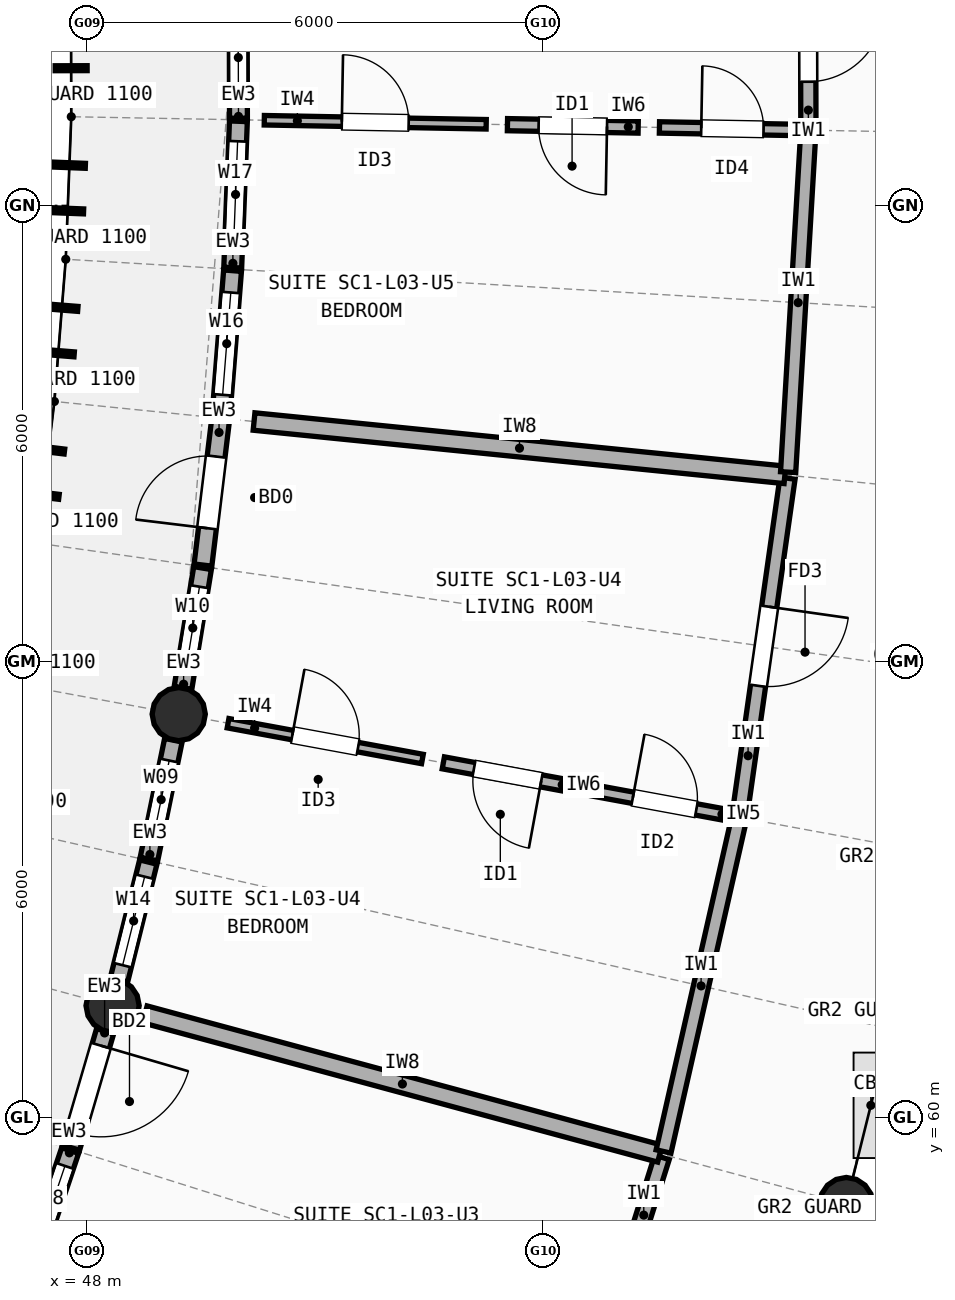
"""IFC4 building model, lengths in metres.
Left out: names, types, materials, properties, quantities, classifications, styles, units other than length and angle.
Written with IfcOpenShell. Run it as: python <this file> out.ifc"""

import sys

from ifc_helpers import new_model, si_unit, direction, frame, frame_2d, origin, origin_2d, place, context, subcontext, project, spatial, rectangle, circle, extrude, element, fill, save


model = new_model("IFC4")
c1 = context("Model", 3, precision=1e-05, world=origin(), true_north=direction((0.0, 1.0)))
c2 = subcontext(c1, "Body", "Model", "MODEL_VIEW")
j1 = project(units=[si_unit("LENGTHUNIT", "METRE"), si_unit("PLANEANGLEUNIT", "RADIAN")], contexts=[c1])
p1 = place(None, origin())
s1 = spatial("IfcSite", under=j1, at=p1, CompositionType="ELEMENT")
p2 = place(p1, origin())
s2 = spatial("IfcBuilding", under=s1, at=p2, CompositionType="ELEMENT")
p3 = place(p2, frame((0.0, 0.0, 10.9)))
s3 = spatial("IfcBuildingStorey", under=s2, at=p3, CompositionType="ELEMENT", Elevation=10.9)
for number, where, z_axis, x_axis in (
    (1, (48.336, 61.471, 0.0), (0.0, 0.0, 1.0), (1.0, 0.0, 0.0)),
    (2, (57.99, 58.861, 0.0), (0.0, 0.0, 1.0), (1.0, 0.0, 0.0)),
    (3, (49.206, 65.306, 0.0), (0.0, 0.0, 1.0), (1.0, 0.0, 0.0)),
):
    element("IfcColumn", number, at=place(p3, frame(where, z_axis=z_axis, x_axis=x_axis)), inside=s3, PredefinedType="COLUMN", context=c2, shape_type="SweptSolid", body=[
        extrude(circle(Radius=0.35, at=origin_2d()), origin(), (0.0, 0.0, 1.0), 2.948),
    ])
p4 = place(p3, frame((47.161, 57.739, 0.0), z_axis=(0.0, 0.0, 1.0), x_axis=(0.319798549746, 0.947485560618, 0.0)))
e4 = element("IfcWall", 4, at=p4, inside=s3, PredefinedType="STANDARD", context=c2, shape_type="SweptSolid", body=[
    extrude(rectangle(XDim=1.927, YDim=0.235, at=frame_2d((0.963, 0.0))), origin(), (0.0, 0.0, 1.0), 2.684),
])
p5 = place(p4, frame((0.213, 0.0, 0.85)))
e5 = element("IfcOpeningElement", 5, at=p5, cuts=e4, PredefinedType="OPENING", context=c2, shape_type="SweptSolid", body=[
    extrude(rectangle(XDim=1.5, YDim=1.4, at=frame_2d((0.75, 0.7))), frame((0.0, 0.127, 0.0), z_axis=(0.0, -1.0, 0.0), x_axis=(1.0, 0.0, 0.0)), (0.0, 0.0, 1.0), 0.255),
])
p6 = place(p3, frame((47.79, 59.603, 0.0), z_axis=(0.0, 0.0, 1.0), x_axis=(0.28073386291, 0.959785652224, 0.0)))
e6 = element("IfcWall", 6, at=p6, inside=s3, PredefinedType="STANDARD", context=c2, shape_type="SweptSolid", body=[
    extrude(rectangle(XDim=1.597, YDim=0.235, at=frame_2d((0.798, 0.0))), origin(), (0.0, 0.0, 1.0), 2.684),
])
p7 = place(p6, frame((0.198, 0.0, 0.0)))
e7 = element("IfcOpeningElement", 7, at=p7, cuts=e6, PredefinedType="OPENING", context=c2, shape_type="SweptSolid", body=[
    extrude(rectangle(XDim=1.2, YDim=2.15, at=frame_2d((0.6, 1.075))), frame((0.0, 0.127, 0.0), z_axis=(0.0, -1.0, 0.0), x_axis=(1.0, 0.0, 0.0)), (0.0, 0.0, 1.0), 0.255),
])
p8 = place(p3, frame((48.42, 61.811, 0.0), z_axis=(0.0, 0.0, 1.0), x_axis=(0.241240447943, 0.970465376135, 0.0)))
e8 = element("IfcWall", 8, at=p8, inside=s3, PredefinedType="STANDARD", context=c2, shape_type="SweptSolid", body=[
    extrude(rectangle(XDim=1.597, YDim=0.235, at=frame_2d((0.798, 0.0))), origin(), (0.0, 0.0, 1.0), 2.684),
])
p9 = place(p8, frame((0.198, 0.0, 0.85)))
e9 = element("IfcOpeningElement", 9, at=p9, cuts=e8, PredefinedType="OPENING", context=c2, shape_type="SweptSolid", body=[
    extrude(rectangle(XDim=1.2, YDim=1.5, at=frame_2d((0.6, 0.75))), frame((0.0, 0.127, 0.0), z_axis=(0.0, -1.0, 0.0), x_axis=(1.0, 0.0, 0.0)), (0.0, 0.0, 1.0), 0.255),
])
p10 = place(p3, frame((48.814, 63.399, 0.0), z_axis=(0.0, 0.0, 1.0), x_axis=(0.201199946108, 0.979550193551, 0.0)))
e10 = element("IfcWall", 10, at=p10, inside=s3, PredefinedType="STANDARD", context=c2, shape_type="SweptSolid", body=[
    extrude(rectangle(XDim=1.597, YDim=0.235, at=frame_2d((0.798, 0.0))), origin(), (0.0, 0.0, 1.0), 2.684),
])
p11 = place(p10, frame((0.273, 0.0, 0.85)))
e11 = element("IfcOpeningElement", 11, at=p11, cuts=e10, PredefinedType="OPENING", context=c2, shape_type="SweptSolid", body=[
    extrude(rectangle(XDim=1.05, YDim=1.35, at=frame_2d((0.525, 0.675))), frame((0.0, 0.127, 0.0), z_axis=(0.0, -1.0, 0.0), x_axis=(1.0, 0.0, 0.0)), (0.0, 0.0, 1.0), 0.255),
])
p12 = place(p3, frame((49.262, 65.652, 0.0), z_axis=(0.0, 0.0, 1.0), x_axis=(0.16100120568, 0.986954209561, 0.0)))
e12 = element("IfcWall", 12, at=p12, inside=s3, PredefinedType="STANDARD", context=c2, shape_type="SweptSolid", body=[
    extrude(rectangle(XDim=1.597, YDim=0.235, at=frame_2d((0.798, 0.0))), origin(), (0.0, 0.0, 1.0), 2.684),
])
p13 = place(p12, frame((0.249, 0.0, 0.85)))
e13 = element("IfcOpeningElement", 13, at=p13, cuts=e12, PredefinedType="OPENING", context=c2, shape_type="SweptSolid", body=[
    extrude(rectangle(XDim=1.1, YDim=1.45, at=frame_2d((0.55, 0.725))), frame((0.0, 0.127, 0.0), z_axis=(0.0, -1.0, 0.0), x_axis=(1.0, 0.0, 0.0)), (0.0, 0.0, 1.0), 0.255),
])
p14 = place(p3, frame((49.525, 67.268, 0.0), z_axis=(0.0, 0.0, 1.0), x_axis=(0.120384349076, 0.992727358592, 0.0)))
e14 = element("IfcWall", 14, at=p14, inside=s3, PredefinedType="STANDARD", context=c2, shape_type="SweptSolid", body=[
    extrude(rectangle(XDim=1.927, YDim=0.235, at=frame_2d((0.963, 0.0))), origin(), (0.0, 0.0, 1.0), 2.684),
])
p15 = place(p14, frame((0.488, 0.0, 0.0)))
e15 = element("IfcOpeningElement", 15, at=p15, cuts=e14, PredefinedType="OPENING", context=c2, shape_type="SweptSolid", body=[
    extrude(rectangle(XDim=0.95, YDim=2.12, at=frame_2d((0.475, 1.06))), frame((0.0, 0.127, 0.0), z_axis=(0.0, -1.0, 0.0), x_axis=(1.0, 0.0, 0.0)), (0.0, 0.0, 1.0), 0.255),
])
p16 = place(p3, frame((49.761, 69.22, 0.0), z_axis=(0.0, 0.0, 1.0), x_axis=(0.079573991137, 0.996828962227, 0.0)))
e16 = element("IfcWall", 16, at=p16, inside=s3, PredefinedType="STANDARD", context=c2, shape_type="SweptSolid", body=[
    extrude(rectangle(XDim=1.927, YDim=0.235, at=frame_2d((0.963, 0.0))), origin(), (0.0, 0.0, 1.0), 2.948),
])
p17 = place(p16, frame((0.289, 0.0, 0.85)))
e17 = element("IfcOpeningElement", 17, at=p17, cuts=e16, PredefinedType="OPENING", context=c2, shape_type="SweptSolid", body=[
    extrude(rectangle(XDim=1.35, YDim=1.5, at=frame_2d((0.675, 0.75))), frame((0.0, 0.127, 0.0), z_axis=(0.0, -1.0, 0.0), x_axis=(1.0, 0.0, 0.0)), (0.0, 0.0, 1.0), 0.255),
])
p18 = place(p3, frame((49.917, 71.181, 0.0), z_axis=(0.0, 0.0, 1.0), x_axis=(0.038647240614, 0.999252916329, 0.0)))
e18 = element("IfcWall", 18, at=p18, inside=s3, PredefinedType="STANDARD", context=c2, shape_type="SweptSolid", body=[
    extrude(rectangle(XDim=1.927, YDim=0.235, at=frame_2d((0.963, 0.0))), origin(), (0.0, 0.0, 1.0), 2.684),
])
p19 = place(p18, frame((0.263, 0.0, 0.85)))
e19 = element("IfcOpeningElement", 19, at=p19, cuts=e18, PredefinedType="OPENING", context=c2, shape_type="SweptSolid", body=[
    extrude(rectangle(XDim=1.4, YDim=1.5, at=frame_2d((0.7, 0.75))), frame((0.0, 0.127, 0.0), z_axis=(0.0, -1.0, 0.0), x_axis=(1.0, 0.0, 0.0)), (0.0, 0.0, 1.0), 0.255),
])
p20 = place(p3, frame((49.992, 73.146, 0.0), z_axis=(0.0, 0.0, 1.0), x_axis=(-0.002293571949, 0.99999736976, 0.0)))
e20 = element("IfcWall", 20, at=p20, inside=s3, PredefinedType="STANDARD", context=c2, shape_type="SweptSolid", body=[
    extrude(rectangle(XDim=1.597, YDim=0.235, at=frame_2d((0.798, 0.0))), origin(), (0.0, 0.0, 1.0), 2.684),
])
p21 = place(p20, frame((0.198, 0.0, 0.85)))
e21 = element("IfcOpeningElement", 21, at=p21, cuts=e20, PredefinedType="OPENING", context=c2, shape_type="SweptSolid", body=[
    extrude(rectangle(XDim=1.2, YDim=1.45, at=frame_2d((0.6, 0.725))), frame((0.0, 0.127, 0.0), z_axis=(0.0, -1.0, 0.0), x_axis=(1.0, 0.0, 0.0)), (0.0, 0.0, 1.0), 0.255),
])
p22 = place(p3, frame((54.222, 55.215, 0.0), z_axis=(0.0, 0.0, 1.0), x_axis=(0.300377958446, 0.953820256694, 0.0)))
e22 = element("IfcWall", 22, at=p22, inside=s3, PredefinedType="SOLIDWALL", context=c2, shape_type="SweptSolid", body=[
    extrude(rectangle(XDim=4.467, YDim=0.2, at=frame_2d((2.233, 0.0))), origin(), (0.0, 0.0, 1.0), 2.742),
])
p23 = place(p22, frame((1.743, 0.0, 0.0)))
e23 = element("IfcOpeningElement", 23, at=p23, cuts=e22, PredefinedType="OPENING", context=c2, shape_type="SweptSolid", body=[
    extrude(rectangle(XDim=0.98, YDim=2.15, at=frame_2d((0.49, 1.075))), frame((0.0, 0.11, 0.0), z_axis=(0.0, -1.0, 0.0), x_axis=(1.0, 0.0, 0.0)), (0.0, 0.0, 1.0), 0.22),
])
p24 = place(p3, frame((48.761, 61.356, 0.0), z_axis=(0.0, 0.0, 1.0), x_axis=(0.965329768393, -0.26103340448, 0.0)))
e24 = element("IfcWall", 24, at=p24, inside=s3, PredefinedType="SOLIDWALL", context=c2, shape_type="SweptSolid", body=[
    extrude(rectangle(XDim=7.02, YDim=0.23, at=frame_2d((3.51, 0.0))), origin(), (0.0, 0.0, 1.0), 2.762),
])
p25 = place(p3, frame((55.585, 59.552, 0.0), z_axis=(0.0, 0.0, 1.0), x_axis=(0.221221895428, 0.97522349899, 0.0)))
e25 = element("IfcWall", 25, at=p25, inside=s3, PredefinedType="SOLIDWALL", context=c2, shape_type="SweptSolid", body=[
    extrude(rectangle(XDim=4.467, YDim=0.2, at=frame_2d((2.234, 0.0))), origin(), (0.0, 0.0, 1.0), 2.722),
])
p26 = place(p3, frame((56.588, 63.988, 0.0), z_axis=(0.0, 0.0, 1.0), x_axis=(0.140732688284, 0.990047630394, 0.0)))
e26 = element("IfcWall", 26, at=p26, inside=s3, PredefinedType="SOLIDWALL", context=c2, shape_type="SweptSolid", body=[
    extrude(rectangle(XDim=4.467, YDim=0.2, at=frame_2d((2.233, 0.0))), origin(), (0.0, 0.0, 1.0), 2.762),
])
p27 = place(p26, frame((1.708, 0.0, 0.0)))
e27 = element("IfcOpeningElement", 27, at=p27, cuts=e26, PredefinedType="OPENING", context=c2, shape_type="SweptSolid", body=[
    extrude(rectangle(XDim=1.05, YDim=2.15, at=frame_2d((0.525, 1.075))), frame((0.0, 0.11, 0.0), z_axis=(0.0, -1.0, 0.0), x_axis=(1.0, 0.0, 0.0)), (0.0, 0.0, 1.0), 0.22),
])
p28 = place(p3, frame((49.855, 65.187, 0.0), z_axis=(0.0, 0.0, 1.0), x_axis=(0.983443502225, -0.181215004706, 0.0)))
e28 = element("IfcWall", 28, at=p28, inside=s3, PredefinedType="PARTITIONING", context=c2, shape_type="SweptSolid", body=[
    extrude(rectangle(XDim=2.6, YDim=0.125, at=frame_2d((1.3, 0.0))), origin(), (0.0, 0.0, 1.0), 2.742),
])
p29 = place(p28, frame((0.86, 0.0, 0.0)))
e29 = element("IfcOpeningElement", 29, at=p29, cuts=e28, PredefinedType="OPENING", context=c2, shape_type="SweptSolid", body=[
    extrude(rectangle(XDim=0.88, YDim=2.1, at=frame_2d((0.44, 1.05))), frame((0.0, 0.073, 0.0), z_axis=(0.0, -1.0, 0.0), x_axis=(1.0, 0.0, 0.0)), (0.0, 0.0, 1.0), 0.145),
])
p30 = place(p3, frame((52.688, 64.665, 0.0), z_axis=(0.0, 0.0, 1.0), x_axis=(0.983463169084, -0.181108241269, 0.0)))
e30 = element("IfcWall", 30, at=p30, inside=s3, PredefinedType="PLUMBINGWALL", context=c2, shape_type="SweptSolid", body=[
    extrude(rectangle(XDim=1.72, YDim=0.16, at=frame_2d((0.86, 0.0))), origin(), (0.0, 0.0, 1.0), 2.742),
])
p31 = place(p30, frame((0.41, 0.0, 0.0)))
e31 = element("IfcOpeningElement", 31, at=p31, cuts=e30, PredefinedType="OPENING", context=c2, shape_type="SweptSolid", body=[
    extrude(rectangle(XDim=0.9, YDim=2.1, at=frame_2d((0.45, 1.05))), frame((0.0, 0.09, 0.0), z_axis=(0.0, -1.0, 0.0), x_axis=(1.0, 0.0, 0.0)), (0.0, 0.0, 1.0), 0.18),
])
p32 = place(p3, frame((54.655, 64.303, 0.0), z_axis=(0.0, 0.0, 1.0), x_axis=(0.983468686283, -0.181078278933, 0.0)))
e32 = element("IfcWall", 32, at=p32, inside=s3, PredefinedType="PARTITIONING", context=c2, shape_type="SweptSolid", body=[
    extrude(rectangle(XDim=1.92, YDim=0.15, at=frame_2d((0.96, 0.0))), origin(), (0.0, 0.0, 1.0), 2.742),
])
p33 = place(p32, frame((0.535, 0.0, 0.0)))
e33 = element("IfcOpeningElement", 33, at=p33, cuts=e32, PredefinedType="OPENING", context=c2, shape_type="SweptSolid", body=[
    extrude(rectangle(XDim=0.85, YDim=2.1, at=frame_2d((0.425, 1.05))), frame((0.0, 0.085, 0.0), z_axis=(0.0, -1.0, 0.0), x_axis=(1.0, 0.0, 0.0)), (0.0, 0.0, 1.0), 0.17),
])
p34 = place(p3, frame((50.197, 69.156, 0.0), z_axis=(0.0, 0.0, 1.0), x_axis=(0.994988519083, -0.09998923389, 0.0)))
e34 = element("IfcWall", 34, at=p34, inside=s3, PredefinedType="SOLIDWALL", context=c2, shape_type="SweptSolid", body=[
    extrude(rectangle(XDim=7.02, YDim=0.23, at=frame_2d((3.51, 0.0))), origin(), (0.0, 0.0, 1.0), 2.722),
])
p35 = place(p3, frame((57.224, 68.49, 0.0), z_axis=(0.0, 0.0, 1.0), x_axis=(0.059132085895, 0.998250167252, 0.0)))
e35 = element("IfcWall", 35, at=p35, inside=s3, PredefinedType="SOLIDWALL", context=c2, shape_type="SweptSolid", body=[
    extrude(rectangle(XDim=4.467, YDim=0.2, at=frame_2d((2.234, 0.0))), origin(), (0.0, 0.0, 1.0), 2.742),
])
p36 = place(p3, frame((57.491, 73.029, 0.0), z_axis=(0.0, 0.0, 1.0), x_axis=(-0.0023367022, 0.999997269908, 0.0)))
e36 = element("IfcWall", 36, at=p36, inside=s3, PredefinedType="SOLIDWALL", context=c2, shape_type="SweptSolid", body=[
    extrude(rectangle(XDim=2.194, YDim=0.2, at=frame_2d((1.097, 0.0))), origin(), (0.0, 0.0, 1.0), 2.96),
])
p37 = place(p36, frame((0.597, 0.0, 0.0)))
e37 = element("IfcOpeningElement", 37, at=p37, cuts=e36, PredefinedType="OPENING", context=c2, shape_type="SweptSolid", body=[
    extrude(rectangle(XDim=1.0, YDim=2.15, at=frame_2d((0.5, 1.075))), frame((0.0, 0.11, 0.0), z_axis=(0.0, -1.0, 0.0), x_axis=(1.0, 0.0, 0.0)), (0.0, 0.0, 1.0), 0.22),
])
p38 = place(p3, frame((50.332, 73.12, 0.0), z_axis=(0.0, 0.0, 1.0), x_axis=(0.999833866331, -0.018227444628, 0.0)))
e38 = element("IfcWall", 38, at=p38, inside=s3, PredefinedType="PARTITIONING", context=c2, shape_type="SweptSolid", body=[
    extrude(rectangle(XDim=2.92, YDim=0.125, at=frame_2d((1.46, 0.0))), origin(), (0.0, 0.0, 1.0), 2.762),
])
p39 = place(p38, frame((1.02, 0.0, 0.0)))
e39 = element("IfcOpeningElement", 39, at=p39, cuts=e38, PredefinedType="OPENING", context=c2, shape_type="SweptSolid", body=[
    extrude(rectangle(XDim=0.88, YDim=2.1, at=frame_2d((0.44, 1.05))), frame((0.0, 0.073, 0.0), z_axis=(0.0, -1.0, 0.0), x_axis=(1.0, 0.0, 0.0)), (0.0, 0.0, 1.0), 0.145),
])
p40 = place(p3, frame((53.531, 73.062, 0.0), z_axis=(0.0, 0.0, 1.0), x_axis=(0.999832350792, -0.018310388026, 0.0)))
e40 = element("IfcWall", 40, at=p40, inside=s3, PredefinedType="PLUMBINGWALL", context=c2, shape_type="SweptSolid", body=[
    extrude(rectangle(XDim=1.72, YDim=0.16, at=frame_2d((0.86, 0.0))), origin(), (0.0, 0.0, 1.0), 2.762),
])
p41 = place(p40, frame((0.41, 0.0, 0.0)))
e41 = element("IfcOpeningElement", 41, at=p41, cuts=e40, PredefinedType="OPENING", context=c2, shape_type="SweptSolid", body=[
    extrude(rectangle(XDim=0.9, YDim=2.1, at=frame_2d((0.45, 1.05))), frame((0.0, 0.09, 0.0), z_axis=(0.0, -1.0, 0.0), x_axis=(1.0, 0.0, 0.0)), (0.0, 0.0, 1.0), 0.18),
])
p42 = place(p3, frame((55.531, 73.025, 0.0), z_axis=(0.0, 0.0, 1.0), x_axis=(0.99983466766, -0.018183436026, 0.0)))
e42 = element("IfcWall", 42, at=p42, inside=s3, PredefinedType="PARTITIONING", context=c2, shape_type="SweptSolid", body=[
    extrude(rectangle(XDim=1.92, YDim=0.15, at=frame_2d((0.96, 0.0))), origin(), (0.0, 0.0, 1.0), 2.762),
])
p43 = place(p42, frame((0.55, 0.0, 0.0)))
e43 = element("IfcOpeningElement", 43, at=p43, cuts=e42, PredefinedType="OPENING", context=c2, shape_type="SweptSolid", body=[
    extrude(rectangle(XDim=0.82, YDim=2.08, at=frame_2d((0.41, 1.04))), frame((0.0, 0.085, 0.0), z_axis=(0.0, -1.0, 0.0), x_axis=(1.0, 0.0, 0.0)), (0.0, 0.0, 1.0), 0.17),
])
p44 = place(p5, origin())
e44 = element("IfcWindow", 44, at=p44, inside=s3, PartitioningType="SINGLE_PANEL", PredefinedType="WINDOW", context=c2, shape_type="SweptSolid", body=[
    extrude(rectangle(XDim=1.5, YDim=1.4, at=frame_2d((0.75, 0.7))), frame((0.0, 0.03, 0.0), z_axis=(0.0, -1.0, 0.0), x_axis=(1.0, 0.0, 0.0)), (0.0, 0.0, 1.0), 0.06),
])
fill(e5, e44)
p45 = place(p7, origin())
e45 = element("IfcDoor", 45, at=p45, inside=s3, OperationType="SINGLE_SWING_RIGHT", PredefinedType="DOOR", context=c2, shape_type="SweptSolid", body=[
    extrude(rectangle(XDim=1.2, YDim=2.15, at=frame_2d((0.6, 1.075))), frame((0.0, 0.025, 0.0), z_axis=(0.0, -1.0, 0.0), x_axis=(1.0, 0.0, 0.0)), (0.0, 0.0, 1.0), 0.05),
])
fill(e7, e45)
p46 = place(p9, origin())
e46 = element("IfcWindow", 46, at=p46, inside=s3, PartitioningType="SINGLE_PANEL", PredefinedType="WINDOW", context=c2, shape_type="SweptSolid", body=[
    extrude(rectangle(XDim=1.2, YDim=1.5, at=frame_2d((0.6, 0.75))), frame((0.0, 0.03, 0.0), z_axis=(0.0, -1.0, 0.0), x_axis=(1.0, 0.0, 0.0)), (0.0, 0.0, 1.0), 0.06),
])
fill(e9, e46)
p47 = place(p11, origin())
e47 = element("IfcWindow", 47, at=p47, inside=s3, PartitioningType="SINGLE_PANEL", PredefinedType="WINDOW", context=c2, shape_type="SweptSolid", body=[
    extrude(rectangle(XDim=1.05, YDim=1.35, at=frame_2d((0.525, 0.675))), frame((0.0, 0.03, 0.0), z_axis=(0.0, -1.0, 0.0), x_axis=(1.0, 0.0, 0.0)), (0.0, 0.0, 1.0), 0.06),
])
fill(e11, e47)
p48 = place(p13, origin())
e48 = element("IfcWindow", 48, at=p48, inside=s3, PartitioningType="SINGLE_PANEL", PredefinedType="WINDOW", context=c2, shape_type="SweptSolid", body=[
    extrude(rectangle(XDim=1.1, YDim=1.45, at=frame_2d((0.55, 0.725))), frame((0.0, 0.03, 0.0), z_axis=(0.0, -1.0, 0.0), x_axis=(1.0, 0.0, 0.0)), (0.0, 0.0, 1.0), 0.06),
])
fill(e13, e48)
p49 = place(p15, origin())
e49 = element("IfcDoor", 49, at=p49, inside=s3, OperationType="SINGLE_SWING_LEFT", PredefinedType="DOOR", context=c2, shape_type="SweptSolid", body=[
    extrude(rectangle(XDim=0.95, YDim=2.12, at=frame_2d((0.475, 1.06))), frame((0.0, 0.025, 0.0), z_axis=(0.0, -1.0, 0.0), x_axis=(1.0, 0.0, 0.0)), (0.0, 0.0, 1.0), 0.05),
])
fill(e15, e49)
p50 = place(p17, origin())
e50 = element("IfcWindow", 50, at=p50, inside=s3, PartitioningType="SINGLE_PANEL", PredefinedType="WINDOW", context=c2, shape_type="SweptSolid", body=[
    extrude(rectangle(XDim=1.35, YDim=1.5, at=frame_2d((0.675, 0.75))), frame((0.0, 0.03, 0.0), z_axis=(0.0, -1.0, 0.0), x_axis=(1.0, 0.0, 0.0)), (0.0, 0.0, 1.0), 0.06),
])
fill(e17, e50)
p51 = place(p19, origin())
e51 = element("IfcWindow", 51, at=p51, inside=s3, PartitioningType="SINGLE_PANEL", PredefinedType="WINDOW", context=c2, shape_type="SweptSolid", body=[
    extrude(rectangle(XDim=1.4, YDim=1.5, at=frame_2d((0.7, 0.75))), frame((0.0, 0.03, 0.0), z_axis=(0.0, -1.0, 0.0), x_axis=(1.0, 0.0, 0.0)), (0.0, 0.0, 1.0), 0.06),
])
fill(e19, e51)
p52 = place(p21, origin())
e52 = element("IfcWindow", 52, at=p52, inside=s3, PartitioningType="SINGLE_PANEL", PredefinedType="WINDOW", context=c2, shape_type="SweptSolid", body=[
    extrude(rectangle(XDim=1.2, YDim=1.45, at=frame_2d((0.6, 0.725))), frame((0.0, 0.03, 0.0), z_axis=(0.0, -1.0, 0.0), x_axis=(1.0, 0.0, 0.0)), (0.0, 0.0, 1.0), 0.06),
])
fill(e21, e52)
p53 = place(p27, origin())
e53 = element("IfcDoor", 53, at=p53, inside=s3, OperationType="SINGLE_SWING_RIGHT", PredefinedType="DOOR", context=c2, shape_type="SweptSolid", body=[
    extrude(rectangle(XDim=1.05, YDim=2.15, at=frame_2d((0.525, 1.075))), frame((0.0, 0.025, 0.0), z_axis=(0.0, -1.0, 0.0), x_axis=(1.0, 0.0, 0.0)), (0.0, 0.0, 1.0), 0.05),
])
fill(e27, e53)
p54 = place(p29, origin())
e54 = element("IfcDoor", 54, at=p54, inside=s3, OperationType="SINGLE_SWING_LEFT", PredefinedType="DOOR", context=c2, shape_type="SweptSolid", body=[
    extrude(rectangle(XDim=0.88, YDim=2.1, at=frame_2d((0.44, 1.05))), frame((0.0, 0.025, 0.0), z_axis=(0.0, -1.0, 0.0), x_axis=(1.0, 0.0, 0.0)), (0.0, 0.0, 1.0), 0.05),
])
fill(e29, e54)
p55 = place(p31, origin())
e55 = element("IfcDoor", 55, at=p55, inside=s3, OperationType="SINGLE_SWING_RIGHT", PredefinedType="DOOR", context=c2, shape_type="SweptSolid", body=[
    extrude(rectangle(XDim=0.9, YDim=2.1, at=frame_2d((0.45, 1.05))), frame((0.0, 0.025, 0.0), z_axis=(0.0, -1.0, 0.0), x_axis=(1.0, 0.0, 0.0)), (0.0, 0.0, 1.0), 0.05),
])
fill(e31, e55)
p56 = place(p33, origin())
e56 = element("IfcDoor", 56, at=p56, inside=s3, OperationType="SINGLE_SWING_LEFT", PredefinedType="DOOR", context=c2, shape_type="SweptSolid", body=[
    extrude(rectangle(XDim=0.85, YDim=2.1, at=frame_2d((0.425, 1.05))), frame((0.0, 0.025, 0.0), z_axis=(0.0, -1.0, 0.0), x_axis=(1.0, 0.0, 0.0)), (0.0, 0.0, 1.0), 0.05),
])
fill(e33, e56)
p57 = place(p37, origin())
e57 = element("IfcDoor", 57, at=p57, inside=s3, OperationType="SINGLE_SWING_RIGHT", PredefinedType="DOOR", context=c2, shape_type="SweptSolid", body=[
    extrude(rectangle(XDim=1.0, YDim=2.15, at=frame_2d((0.5, 1.075))), frame((0.0, 0.025, 0.0), z_axis=(0.0, -1.0, 0.0), x_axis=(1.0, 0.0, 0.0)), (0.0, 0.0, 1.0), 0.05),
])
fill(e37, e57)
p58 = place(p39, origin())
e58 = element("IfcDoor", 58, at=p58, inside=s3, OperationType="SINGLE_SWING_LEFT", PredefinedType="DOOR", context=c2, shape_type="SweptSolid", body=[
    extrude(rectangle(XDim=0.88, YDim=2.1, at=frame_2d((0.44, 1.05))), frame((0.0, 0.025, 0.0), z_axis=(0.0, -1.0, 0.0), x_axis=(1.0, 0.0, 0.0)), (0.0, 0.0, 1.0), 0.05),
])
fill(e39, e58)
p59 = place(p41, origin())
e59 = element("IfcDoor", 59, at=p59, inside=s3, OperationType="SINGLE_SWING_RIGHT", PredefinedType="DOOR", context=c2, shape_type="SweptSolid", body=[
    extrude(rectangle(XDim=0.9, YDim=2.1, at=frame_2d((0.45, 1.05))), frame((0.0, 0.025, 0.0), z_axis=(0.0, -1.0, 0.0), x_axis=(1.0, 0.0, 0.0)), (0.0, 0.0, 1.0), 0.05),
])
fill(e41, e59)
p60 = place(p43, origin())
e60 = element("IfcDoor", 60, at=p60, inside=s3, OperationType="SINGLE_SWING_LEFT", PredefinedType="DOOR", context=c2, shape_type="SweptSolid", body=[
    extrude(rectangle(XDim=0.82, YDim=2.08, at=frame_2d((0.41, 1.04))), frame((0.0, 0.025, 0.0), z_axis=(0.0, -1.0, 0.0), x_axis=(1.0, 0.0, 0.0)), (0.0, 0.0, 1.0), 0.05),
])
fill(e43, e60)
save(model, sys.argv[1])
